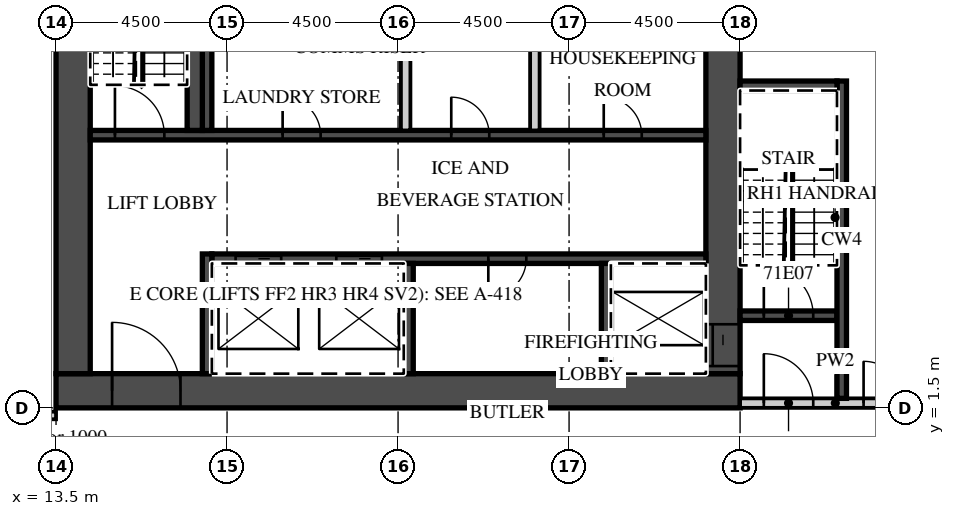
"""IFC4 building model, lengths in metres.
Left out: names, types, materials, properties, quantities, classifications, styles, units other than length and angle.
Written with IfcOpenShell. Run it as: python <this file> out.ifc"""

import sys

from ifc_helpers import new_model, si_unit, direction, frame, frame_2d, origin, place, context, subcontext, project, spatial, rectangle, extrude, element, fill, save


model = new_model("IFC4")
c1 = context("Model", 3, precision=1e-05, world=origin(), true_north=direction((0.0, 1.0)))
c2 = subcontext(c1, "Body", "Model", "MODEL_VIEW")
j1 = project(units=[si_unit("LENGTHUNIT", "METRE"), si_unit("PLANEANGLEUNIT", "RADIAN")], contexts=[c1])
p1 = place(None, origin())
s1 = spatial("IfcSite", under=j1, at=p1, CompositionType="ELEMENT")
p2 = place(p1, origin())
s2 = spatial("IfcBuilding", under=s1, at=p2, CompositionType="ELEMENT")
p3 = place(p2, frame((0.0, 0.0, 285.0)))
s3 = spatial("IfcBuildingStorey", under=s2, at=p3, CompositionType="ELEMENT", Elevation=285.0)
p4 = place(p3, frame((38.132, -12.858, 0.0), z_axis=(0.0, 0.0, 1.0), x_axis=(-0.095847749461, 0.995396006082, 0.0)))
e1 = element("IfcWall", 1, at=p4, inside=s3, PredefinedType="SOLIDWALL", context=c2, shape_type="SweptSolid", body=[
    extrude(rectangle(XDim=32.0, YDim=0.45, at=frame_2d((16.0, 0.0))), origin(), (0.0, 0.0, 1.0), 3.02),
])
p5 = place(p3, frame((-39.909, 1.3, 0.0), z_axis=(0.0, 0.0, 1.0), x_axis=(1.0, 0.0, 0.0)))
e2 = element("IfcWall", 2, at=p5, inside=s3, PredefinedType="PARTITIONING", context=c2, shape_type="SweptSolid", body=[
    extrude(rectangle(XDim=53.409, YDim=0.2, at=frame_2d((26.705, 0.0))), origin(), (0.0, 0.0, 1.0), 3.02),
])
p6 = place(p5, frame((0.15, 0.0, 0.0)))
e3 = element("IfcOpeningElement", 3, at=p6, cuts=e2, PredefinedType="OPENING", context=c2, shape_type="SweptSolid", body=[
    extrude(rectangle(XDim=0.9, YDim=2.1, at=frame_2d((0.45, 1.05))), frame((0.0, 0.11, 0.0), z_axis=(0.0, -1.0, 0.0), x_axis=(1.0, 0.0, 0.0)), (0.0, 0.0, 1.0), 0.22),
])
p7 = place(p5, frame((6.347, 0.0, 0.0)))
e4 = element("IfcOpeningElement", 4, at=p7, cuts=e2, PredefinedType="OPENING", context=c2, shape_type="SweptSolid", body=[
    extrude(rectangle(XDim=1.2, YDim=2.1, at=frame_2d((0.6, 1.05))), frame((0.0, 0.11, 0.0), z_axis=(0.0, -1.0, 0.0), x_axis=(1.0, 0.0, 0.0)), (0.0, 0.0, 1.0), 0.22),
])
p8 = place(p5, frame((15.347, 0.0, 0.0)))
e5 = element("IfcOpeningElement", 5, at=p8, cuts=e2, PredefinedType="OPENING", context=c2, shape_type="SweptSolid", body=[
    extrude(rectangle(XDim=1.2, YDim=2.1, at=frame_2d((0.6, 1.05))), frame((0.0, 0.11, 0.0), z_axis=(0.0, -1.0, 0.0), x_axis=(1.0, 0.0, 0.0)), (0.0, 0.0, 1.0), 0.22),
])
p9 = place(p5, frame((24.346, 0.0, 0.0)))
e6 = element("IfcOpeningElement", 6, at=p9, cuts=e2, PredefinedType="OPENING", context=c2, shape_type="SweptSolid", body=[
    extrude(rectangle(XDim=1.2, YDim=2.1, at=frame_2d((0.6, 1.05))), frame((0.0, 0.11, 0.0), z_axis=(0.0, -1.0, 0.0), x_axis=(1.0, 0.0, 0.0)), (0.0, 0.0, 1.0), 0.22),
])
p10 = place(p5, frame((33.346, 0.0, 0.0)))
e7 = element("IfcOpeningElement", 7, at=p10, cuts=e2, PredefinedType="OPENING", context=c2, shape_type="SweptSolid", body=[
    extrude(rectangle(XDim=1.2, YDim=2.1, at=frame_2d((0.6, 1.05))), frame((0.0, 0.11, 0.0), z_axis=(0.0, -1.0, 0.0), x_axis=(1.0, 0.0, 0.0)), (0.0, 0.0, 1.0), 0.22),
])
p11 = place(p5, frame((42.346, 0.0, 0.0)))
e8 = element("IfcOpeningElement", 8, at=p11, cuts=e2, PredefinedType="OPENING", context=c2, shape_type="SweptSolid", body=[
    extrude(rectangle(XDim=1.2, YDim=2.1, at=frame_2d((0.6, 1.05))), frame((0.0, 0.11, 0.0), z_axis=(0.0, -1.0, 0.0), x_axis=(1.0, 0.0, 0.0)), (0.0, 0.0, 1.0), 0.22),
])
p12 = place(p5, frame((51.834, 0.0, 0.0)))
e9 = element("IfcOpeningElement", 9, at=p12, cuts=e2, PredefinedType="OPENING", context=c2, shape_type="SweptSolid", body=[
    extrude(rectangle(XDim=1.0, YDim=2.1, at=frame_2d((0.5, 1.05))), frame((0.0, 0.11, 0.0), z_axis=(0.0, -1.0, 0.0), x_axis=(1.0, 0.0, 0.0)), (0.0, 0.0, 1.0), 0.22),
])
p13 = place(p3, frame((13.5, 1.95, 0.0), z_axis=(0.0, 0.0, 1.0), x_axis=(1.0, 0.0, 0.0)))
e10 = element("IfcWall", 10, at=p13, inside=s3, PredefinedType="SHEAR", context=c2, shape_type="SweptSolid", body=[
    extrude(rectangle(XDim=18.0, YDim=0.9, at=frame_2d((9.0, 0.0))), origin(), (0.0, 0.0, 1.0), 3.02),
])
p14 = place(p13, frame((1.475, 0.0, 0.0)))
e11 = element("IfcOpeningElement", 11, at=p14, cuts=e10, PredefinedType="OPENING", context=c2, shape_type="SweptSolid", body=[
    extrude(rectangle(XDim=1.8, YDim=2.1, at=frame_2d((0.9, 1.05))), frame((0.0, 0.46, 0.0), z_axis=(0.0, -1.0, 0.0), x_axis=(1.0, 0.0, 0.0)), (0.0, 0.0, 1.0), 0.92),
])
p15 = place(p3, frame((31.05, 2.4, 0.0), z_axis=(0.0, 0.0, 1.0), x_axis=(0.0, 1.0, 0.0)))
e12 = element("IfcWall", 12, at=p15, inside=s3, PredefinedType="SHEAR", context=c2, shape_type="SweptSolid", body=[
    extrude(rectangle(XDim=12.8, YDim=0.9, at=frame_2d((6.4, 0.0))), origin(), (0.0, 0.0, 1.0), 3.02),
])
p16 = place(p15, frame((0.2, 0.0, 0.0)))
e13 = element("IfcOpeningElement", 13, at=p16, cuts=e12, PredefinedType="OPENING", context=c2, shape_type="SweptSolid", body=[
    extrude(rectangle(XDim=1.1, YDim=2.1, at=frame_2d((0.55, 1.05))), frame((0.0, 0.46, 0.0), z_axis=(0.0, -1.0, 0.0), x_axis=(1.0, 0.0, 0.0)), (0.0, 0.0, 1.0), 0.92),
])
p17 = place(p3, frame((13.95, 2.4, 0.0), z_axis=(0.0, 0.0, 1.0), x_axis=(0.0, 1.0, 0.0)))
e14 = element("IfcWall", 14, at=p17, inside=s3, PredefinedType="SHEAR", context=c2, shape_type="SweptSolid", body=[
    extrude(rectangle(XDim=12.2, YDim=0.9, at=frame_2d((6.1, 0.0))), origin(), (0.0, 0.0, 1.0), 3.02),
])
p18 = place(p3, frame((17.6, 5.425, 0.0), z_axis=(0.0, 0.0, 1.0), x_axis=(1.0, 0.0, 0.0)))
e15 = element("IfcWall", 15, at=p18, inside=s3, PredefinedType="SHEAR", context=c2, shape_type="SweptSolid", body=[
    extrude(rectangle(XDim=13.0, YDim=0.25, at=frame_2d((6.5, 0.0))), origin(), (0.0, 0.0, 1.0), 3.02),
])
p19 = place(p18, frame((3.275, 0.0, 0.0)))
e16 = element("IfcOpeningElement", 16, at=p19, cuts=e15, PredefinedType="OPENING", context=c2, shape_type="SweptSolid", body=[
    extrude(rectangle(XDim=1.2, YDim=2.1, at=frame_2d((0.6, 1.05))), frame((0.0, 0.135, 0.0), z_axis=(0.0, -1.0, 0.0), x_axis=(1.0, 0.0, 0.0)), (0.0, 0.0, 1.0), 0.27),
])
p20 = place(p18, frame((0.625, 0.0, 0.0)))
e17 = element("IfcOpeningElement", 17, at=p20, cuts=e15, PredefinedType="OPENING", context=c2, shape_type="SweptSolid", body=[
    extrude(rectangle(XDim=1.2, YDim=2.1, at=frame_2d((0.6, 1.05))), frame((0.0, 0.135, 0.0), z_axis=(0.0, -1.0, 0.0), x_axis=(1.0, 0.0, 0.0)), (0.0, 0.0, 1.0), 0.27),
])
p21 = place(p18, frame((7.275, 0.0, 0.0)))
e18 = element("IfcOpeningElement", 18, at=p21, cuts=e15, PredefinedType="OPENING", context=c2, shape_type="SweptSolid", body=[
    extrude(rectangle(XDim=1.0, YDim=2.1, at=frame_2d((0.5, 1.05))), frame((0.0, 0.135, 0.0), z_axis=(0.0, -1.0, 0.0), x_axis=(1.0, 0.0, 0.0)), (0.0, 0.0, 1.0), 0.27),
])
p22 = place(p3, frame((17.475, 2.4, 0.0), z_axis=(0.0, 0.0, 1.0), x_axis=(0.0, 1.0, 0.0)))
e19 = element("IfcWall", 19, at=p22, inside=s3, PredefinedType="SHEAR", context=c2, shape_type="SweptSolid", body=[
    extrude(rectangle(XDim=3.15, YDim=0.25, at=frame_2d((1.575, 0.0))), origin(), (0.0, 0.0, 1.0), 3.02),
])
for number, where, z_axis, x_axis in (
    (20, (27.975, 2.4, 0.0), (0.0, 0.0, 1.0), (0.0, 1.0, 0.0)),
    (21, (22.775, 2.4, 0.0), (0.0, 0.0, 1.0), (0.0, 1.0, 0.0)),
):
    element("IfcWall", number, at=place(p3, frame(where, z_axis=z_axis, x_axis=x_axis)), inside=s3, PredefinedType="SHEAR", context=c2, shape_type="SweptSolid", body=[
        extrude(rectangle(XDim=2.9, YDim=0.25, at=frame_2d((1.45, 0.0))), origin(), (0.0, 0.0, 1.0), 3.02),
    ])
p23 = place(p3, frame((14.4, 8.675, 0.0), z_axis=(0.0, 0.0, 1.0), x_axis=(1.0, 0.0, 0.0)))
e22 = element("IfcWall", 22, at=p23, inside=s3, PredefinedType="SHEAR", context=c2, shape_type="SweptSolid", body=[
    extrude(rectangle(XDim=16.2, YDim=0.25, at=frame_2d((8.1, 0.0))), origin(), (0.0, 0.0, 1.0), 3.02),
])
p24 = place(p23, frame((0.65, 0.0, 0.0)))
e23 = element("IfcOpeningElement", 23, at=p24, cuts=e22, PredefinedType="OPENING", context=c2, shape_type="SweptSolid", body=[
    extrude(rectangle(XDim=1.3, YDim=2.1, at=frame_2d((0.65, 1.05))), frame((0.0, 0.135, 0.0), z_axis=(0.0, -1.0, 0.0), x_axis=(1.0, 0.0, 0.0)), (0.0, 0.0, 1.0), 0.27),
])
p25 = place(p23, frame((13.512, 0.0, 0.0)))
e24 = element("IfcOpeningElement", 24, at=p25, cuts=e22, PredefinedType="OPENING", context=c2, shape_type="SweptSolid", body=[
    extrude(rectangle(XDim=1.0, YDim=2.1, at=frame_2d((0.5, 1.05))), frame((0.0, 0.135, 0.0), z_axis=(0.0, -1.0, 0.0), x_axis=(1.0, 0.0, 0.0)), (0.0, 0.0, 1.0), 0.27),
])
p26 = place(p23, frame((9.5, 0.0, 0.0)))
e25 = element("IfcOpeningElement", 25, at=p26, cuts=e22, PredefinedType="OPENING", context=c2, shape_type="SweptSolid", body=[
    extrude(rectangle(XDim=1.0, YDim=2.1, at=frame_2d((0.5, 1.05))), frame((0.0, 0.135, 0.0), z_axis=(0.0, -1.0, 0.0), x_axis=(1.0, 0.0, 0.0)), (0.0, 0.0, 1.0), 0.27),
])
p27 = place(p23, frame((5.062, 0.0, 0.0)))
e26 = element("IfcOpeningElement", 26, at=p27, cuts=e22, PredefinedType="OPENING", context=c2, shape_type="SweptSolid", body=[
    extrude(rectangle(XDim=1.0, YDim=2.1, at=frame_2d((0.5, 1.05))), frame((0.0, 0.135, 0.0), z_axis=(0.0, -1.0, 0.0), x_axis=(1.0, 0.0, 0.0)), (0.0, 0.0, 1.0), 0.27),
])
p28 = place(p3, frame((17.475, 8.8, 0.0), z_axis=(0.0, 0.0, 1.0), x_axis=(0.0, 1.0, 0.0)))
e27 = element("IfcWall", 27, at=p28, inside=s3, PredefinedType="SHEAR", context=c2, shape_type="SweptSolid", body=[
    extrude(rectangle(XDim=2.9, YDim=0.25, at=frame_2d((1.45, 0.0))), origin(), (0.0, 0.0, 1.0), 3.02),
])
for number, where, z_axis, x_axis in (
    (28, (26.1, 8.8, 0.0), (0.0, 0.0, 1.0), (0.0, 1.0, 0.0)),
    (29, (22.7, 8.8, 0.0), (0.0, 0.0, 1.0), (0.0, 1.0, 0.0)),
):
    element("IfcWall", number, at=place(p3, frame(where, z_axis=z_axis, x_axis=x_axis)), inside=s3, PredefinedType="PARTITIONING", context=c2, shape_type="SweptSolid", body=[
        extrude(rectangle(XDim=2.9, YDim=0.25, at=frame_2d((1.45, 0.0))), origin(), (0.0, 0.0, 1.0), 3.02),
    ])
p29 = place(p3, frame((17.15, 8.8, 0.0), z_axis=(0.0, 0.0, 1.0), x_axis=(0.0, 1.0, 0.0)))
e30 = element("IfcWall", 30, at=p29, inside=s3, PredefinedType="SHEAR", context=c2, shape_type="SweptSolid", body=[
    extrude(rectangle(XDim=5.8, YDim=0.4, at=frame_2d((2.9, 0.0))), origin(), (0.0, 0.0, 1.0), 3.02),
])
p30 = place(p3, frame((31.5, 1.625, 0.0), z_axis=(0.0, 0.0, 1.0), x_axis=(1.0, 0.0, 0.0)))
e31 = element("IfcWall", 31, at=p30, inside=s3, PredefinedType="PARTITIONING", context=c2, shape_type="SweptSolid", body=[
    extrude(rectangle(XDim=5.012, YDim=0.25, at=frame_2d((2.506, 0.0))), origin(), (0.0, 0.0, 1.0), 3.02),
])
p31 = place(p30, frame((0.625, 0.0, 0.0)))
e32 = element("IfcOpeningElement", 32, at=p31, cuts=e31, PredefinedType="OPENING", context=c2, shape_type="SweptSolid", body=[
    extrude(rectangle(XDim=1.3, YDim=2.1, at=frame_2d((0.65, 1.05))), frame((0.0, 0.135, 0.0), z_axis=(0.0, -1.0, 0.0), x_axis=(1.0, 0.0, 0.0)), (0.0, 0.0, 1.0), 0.27),
])
p32 = place(p30, frame((3.25, 0.0, 0.0)))
e33 = element("IfcOpeningElement", 33, at=p32, cuts=e31, PredefinedType="OPENING", context=c2, shape_type="SweptSolid", body=[
    extrude(rectangle(XDim=1.1, YDim=2.1, at=frame_2d((0.55, 1.05))), frame((0.0, 0.135, 0.0), z_axis=(0.0, -1.0, 0.0), x_axis=(1.0, 0.0, 0.0)), (0.0, 0.0, 1.0), 0.27),
])
p33 = place(p3, frame((31.5, 3.925, 0.0), z_axis=(0.0, 0.0, 1.0), x_axis=(1.0, 0.0, 0.0)))
e34 = element("IfcWall", 34, at=p33, inside=s3, PredefinedType="SHEAR", context=c2, shape_type="SweptSolid", body=[
    extrude(rectangle(XDim=2.55, YDim=0.25, at=frame_2d((1.275, 0.0))), origin(), (0.0, 0.0, 1.0), 3.02),
])
p34 = place(p33, frame((0.625, 0.0, 0.0)))
e35 = element("IfcOpeningElement", 35, at=p34, cuts=e34, PredefinedType="OPENING", context=c2, shape_type="SweptSolid", body=[
    extrude(rectangle(XDim=1.3, YDim=2.1, at=frame_2d((0.65, 1.05))), frame((0.0, 0.135, 0.0), z_axis=(0.0, -1.0, 0.0), x_axis=(1.0, 0.0, 0.0)), (0.0, 0.0, 1.0), 0.27),
])
p35 = place(p3, frame((34.175, 1.75, 0.0), z_axis=(0.0, 0.0, 1.0), x_axis=(0.0, 1.0, 0.0)))
e36 = element("IfcWall", 36, at=p35, inside=s3, PredefinedType="SHEAR", context=c2, shape_type="SweptSolid", body=[
    extrude(rectangle(XDim=8.35, YDim=0.25, at=frame_2d((4.175, 0.0))), origin(), (0.0, 0.0, 1.0), 3.02),
])
p36 = place(p3, frame((31.5, 9.975, 0.0), z_axis=(0.0, 0.0, 1.0), x_axis=(1.0, 0.0, 0.0)))
e37 = element("IfcWall", 37, at=p36, inside=s3, PredefinedType="SHEAR", context=c2, shape_type="SweptSolid", body=[
    extrude(rectangle(XDim=2.55, YDim=0.25, at=frame_2d((1.275, 0.0))), origin(), (0.0, 0.0, 1.0), 3.02),
])
p37 = place(p19, origin())
e38 = element("IfcDoor", 38, at=p37, inside=s3, OperationType="SLIDING_TO_RIGHT", PredefinedType="DOOR", context=c2, shape_type="SweptSolid", body=[
    extrude(rectangle(XDim=1.2, YDim=2.1, at=frame_2d((0.6, 1.05))), frame((0.0, 0.025, 0.0), z_axis=(0.0, -1.0, 0.0), x_axis=(1.0, 0.0, 0.0)), (0.0, 0.0, 1.0), 0.05),
])
fill(e16, e38)
p38 = place(p20, origin())
e39 = element("IfcDoor", 39, at=p38, inside=s3, OperationType="SLIDING_TO_LEFT", PredefinedType="DOOR", context=c2, shape_type="SweptSolid", body=[
    extrude(rectangle(XDim=1.2, YDim=2.1, at=frame_2d((0.6, 1.05))), frame((0.0, 0.025, 0.0), z_axis=(0.0, -1.0, 0.0), x_axis=(1.0, 0.0, 0.0)), (0.0, 0.0, 1.0), 0.05),
])
fill(e17, e39)
p39 = place(p16, origin())
e40 = element("IfcDoor", 40, at=p39, inside=s3, OperationType="SLIDING_TO_LEFT", PredefinedType="DOOR", context=c2, shape_type="SweptSolid", body=[
    extrude(rectangle(XDim=1.1, YDim=2.1, at=frame_2d((0.55, 1.05))), frame((0.0, 0.025, 0.0), z_axis=(0.0, -1.0, 0.0), x_axis=(1.0, 0.0, 0.0)), (0.0, 0.0, 1.0), 0.05),
])
fill(e13, e40)
p40 = place(p14, origin())
e41 = element("IfcDoor", 41, at=p40, inside=s3, OperationType="DOUBLE_DOOR_DOUBLE_SWING", PredefinedType="DOOR", context=c2, shape_type="SweptSolid", body=[
    extrude(rectangle(XDim=1.8, YDim=2.1, at=frame_2d((0.9, 1.05))), frame((0.0, 0.025, 0.0), z_axis=(0.0, -1.0, 0.0), x_axis=(1.0, 0.0, 0.0)), (0.0, 0.0, 1.0), 0.05),
])
fill(e11, e41)
p41 = place(p31, origin())
e42 = element("IfcDoor", 42, at=p41, inside=s3, OperationType="SINGLE_SWING_LEFT", PredefinedType="DOOR", context=c2, shape_type="SweptSolid", body=[
    extrude(rectangle(XDim=1.3, YDim=2.1, at=frame_2d((0.65, 1.05))), frame((0.0, 0.025, 0.0), z_axis=(0.0, -1.0, 0.0), x_axis=(1.0, 0.0, 0.0)), (0.0, 0.0, 1.0), 0.05),
])
fill(e32, e42)
p42 = place(p34, origin())
e43 = element("IfcDoor", 43, at=p42, inside=s3, OperationType="SINGLE_SWING_LEFT", PredefinedType="DOOR", context=c2, shape_type="SweptSolid", body=[
    extrude(rectangle(XDim=1.3, YDim=2.1, at=frame_2d((0.65, 1.05))), frame((0.0, 0.025, 0.0), z_axis=(0.0, -1.0, 0.0), x_axis=(1.0, 0.0, 0.0)), (0.0, 0.0, 1.0), 0.05),
])
fill(e35, e43)
p43 = place(p32, origin())
e44 = element("IfcDoor", 44, at=p43, inside=s3, OperationType="SINGLE_SWING_LEFT", PredefinedType="DOOR", context=c2, shape_type="SweptSolid", body=[
    extrude(rectangle(XDim=1.1, YDim=2.1, at=frame_2d((0.55, 1.05))), frame((0.0, 0.025, 0.0), z_axis=(0.0, -1.0, 0.0), x_axis=(1.0, 0.0, 0.0)), (0.0, 0.0, 1.0), 0.05),
])
fill(e33, e44)
p44 = place(p24, origin())
e45 = element("IfcDoor", 45, at=p44, inside=s3, OperationType="SINGLE_SWING_LEFT", PredefinedType="DOOR", context=c2, shape_type="SweptSolid", body=[
    extrude(rectangle(XDim=1.3, YDim=2.1, at=frame_2d((0.65, 1.05))), frame((0.0, 0.025, 0.0), z_axis=(0.0, -1.0, 0.0), x_axis=(1.0, 0.0, 0.0)), (0.0, 0.0, 1.0), 0.05),
])
fill(e23, e45)
p45 = place(p25, origin())
e46 = element("IfcDoor", 46, at=p45, inside=s3, OperationType="SINGLE_SWING_LEFT", PredefinedType="DOOR", context=c2, shape_type="SweptSolid", body=[
    extrude(rectangle(XDim=1.0, YDim=2.1, at=frame_2d((0.5, 1.05))), frame((0.0, 0.025, 0.0), z_axis=(0.0, -1.0, 0.0), x_axis=(1.0, 0.0, 0.0)), (0.0, 0.0, 1.0), 0.05),
])
fill(e24, e46)
p46 = place(p26, origin())
e47 = element("IfcDoor", 47, at=p46, inside=s3, OperationType="SINGLE_SWING_LEFT", PredefinedType="DOOR", context=c2, shape_type="SweptSolid", body=[
    extrude(rectangle(XDim=1.0, YDim=2.1, at=frame_2d((0.5, 1.05))), frame((0.0, 0.025, 0.0), z_axis=(0.0, -1.0, 0.0), x_axis=(1.0, 0.0, 0.0)), (0.0, 0.0, 1.0), 0.05),
])
fill(e25, e47)
p47 = place(p27, origin())
e48 = element("IfcDoor", 48, at=p47, inside=s3, OperationType="SINGLE_SWING_LEFT", PredefinedType="DOOR", context=c2, shape_type="SweptSolid", body=[
    extrude(rectangle(XDim=1.0, YDim=2.1, at=frame_2d((0.5, 1.05))), frame((0.0, 0.025, 0.0), z_axis=(0.0, -1.0, 0.0), x_axis=(1.0, 0.0, 0.0)), (0.0, 0.0, 1.0), 0.05),
])
fill(e26, e48)
p48 = place(p21, origin())
e49 = element("IfcDoor", 49, at=p48, inside=s3, OperationType="SINGLE_SWING_LEFT", PredefinedType="DOOR", context=c2, shape_type="SweptSolid", body=[
    extrude(rectangle(XDim=1.0, YDim=2.1, at=frame_2d((0.5, 1.05))), frame((0.0, 0.025, 0.0), z_axis=(0.0, -1.0, 0.0), x_axis=(1.0, 0.0, 0.0)), (0.0, 0.0, 1.0), 0.05),
])
fill(e18, e49)
save(model, sys.argv[1])
